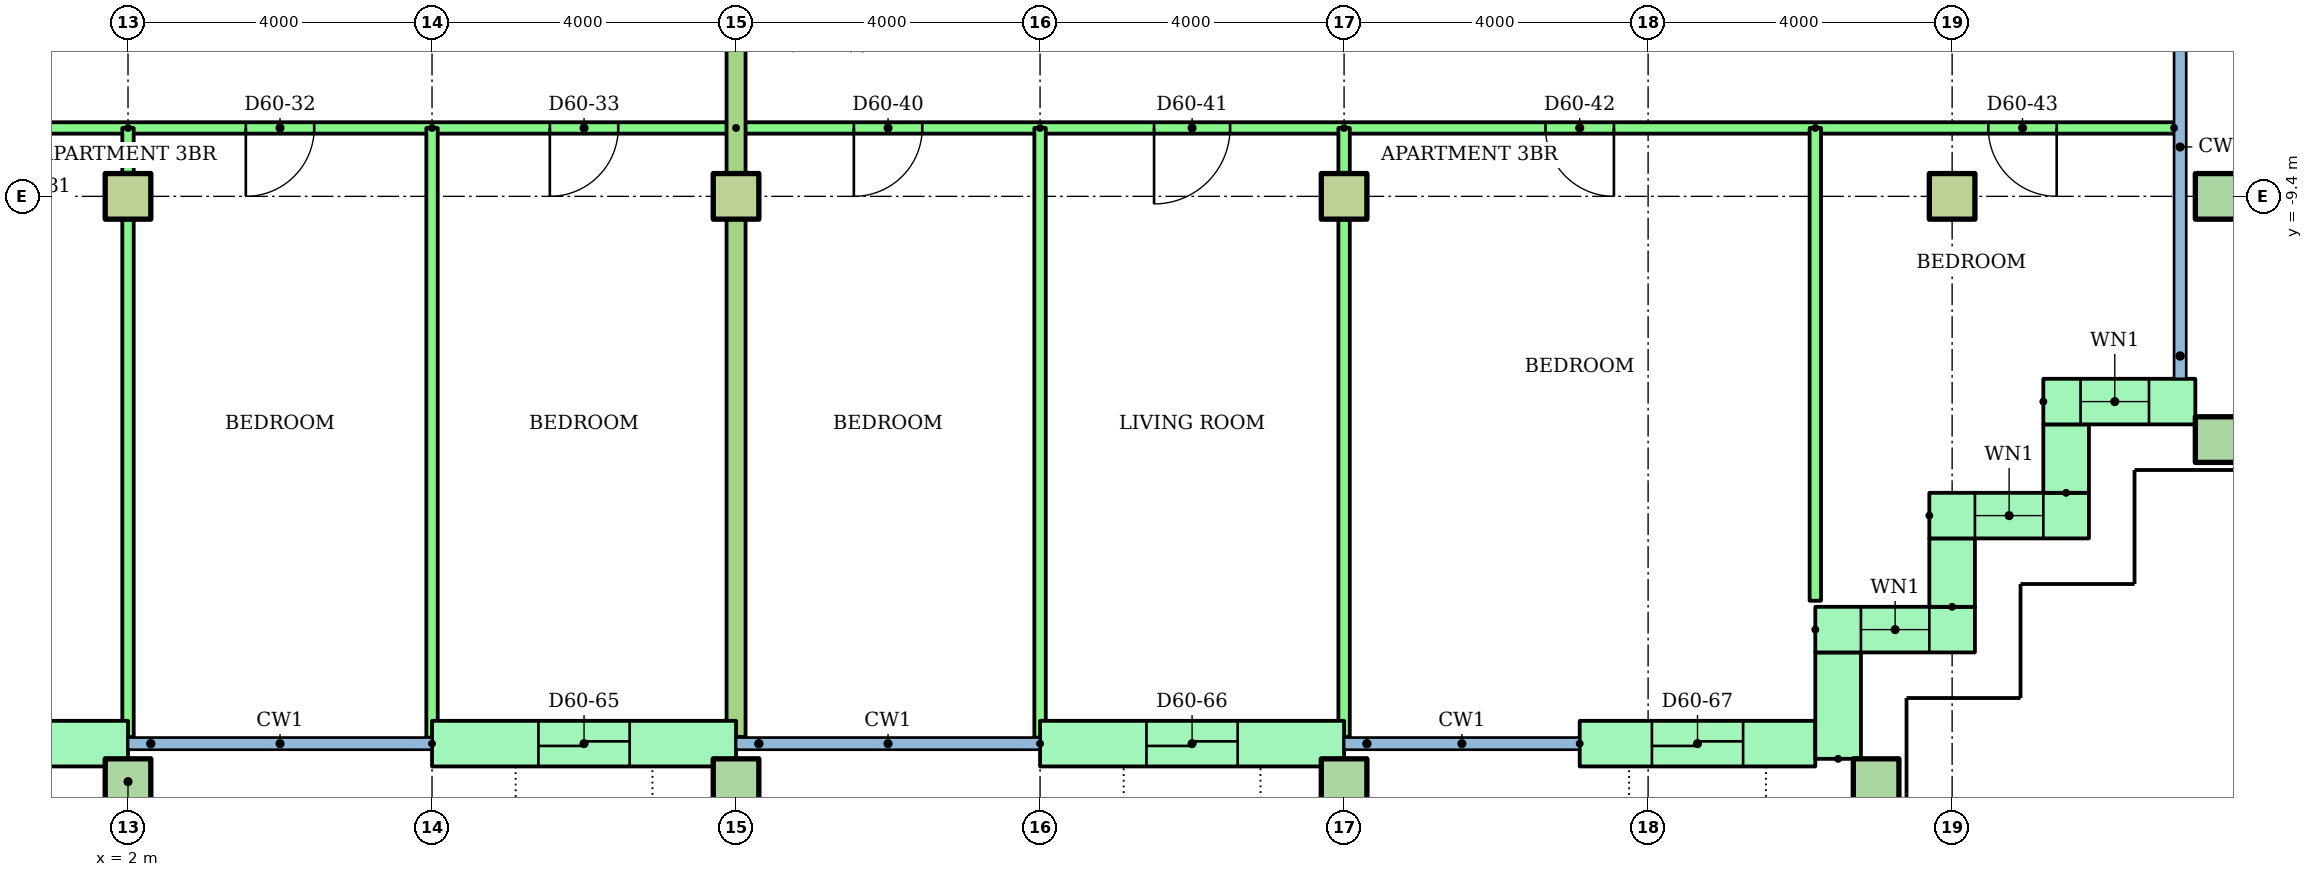
"""IFC4 building model, lengths in metres.
Left out: names, types, materials, properties, quantities, classifications, styles, units other than length and angle.
Written with IfcOpenShell. Run it as: python <this file> out.ifc"""

import sys

from ifc_helpers import new_model, si_unit, direction, frame, frame_2d, origin, origin_2d, place, context, subcontext, project, spatial, rectangle, hollow_rectangle, extrude, element, fill, save


model = new_model("IFC4")
c1 = context("Model", 3, precision=1e-05, world=origin(), true_north=direction((0.0, 1.0)))
c2 = subcontext(c1, "Body", "Model", "MODEL_VIEW")
j1 = project(units=[si_unit("LENGTHUNIT", "METRE"), si_unit("PLANEANGLEUNIT", "RADIAN")], contexts=[c1])
p1 = place(None, origin())
s1 = spatial("IfcSite", under=j1, at=p1, CompositionType="ELEMENT")
p2 = place(p1, origin())
s2 = spatial("IfcBuilding", under=s1, at=p2, CompositionType="ELEMENT")
p3 = place(p2, frame((0.0, 0.0, 230.0)))
s3 = spatial("IfcBuildingStorey", under=s2, at=p3, CompositionType="ELEMENT", Elevation=230.0)
for number, where in (
    (1, (2.0, -17.1, 0.0)),
    (2, (10.0, -17.1, 0.0)),
    (3, (18.0, -17.1, 0.0)),
    (4, (25.0, -17.1, 0.0)),
    (5, (29.5, -12.6, 0.0)),
):
    element("IfcColumn", number, at=place(p3, frame(where)), inside=s3, PredefinedType="COLUMN", context=c2, shape_type="SweptSolid", body=[
        extrude(hollow_rectangle(XDim=0.6, YDim=0.6, WallThickness=0.03, at=origin_2d()), origin(), (0.0, 0.0, 1.0), 3.2),
    ])
for number, where in (
    (6, (2.0, -9.4, 0.0)),
    (7, (10.0, -9.4, 0.0)),
    (8, (18.0, -9.4, 0.0)),
    (9, (26.0, -9.4, 0.0)),
):
    element("IfcColumn", number, at=place(p3, frame(where)), inside=s3, PredefinedType="COLUMN", context=c2, shape_type="SweptSolid", body=[
        extrude(rectangle(XDim=0.6, YDim=0.6, at=origin_2d()), origin(), (0.0, 0.0, 1.0), 3.2),
    ])
p4 = place(p3, frame((29.5, -9.4, 0.0)))
e10 = element("IfcColumn", 10, at=p4, inside=s3, PredefinedType="COLUMN", context=c2, shape_type="SweptSolid", body=[
    extrude(hollow_rectangle(XDim=0.6, YDim=0.6, WallThickness=0.03, at=origin_2d()), origin(), (0.0, 0.0, 1.0), 3.2),
])
p5 = place(p3, frame((-2.0, -16.6, 0.0)))
e11 = element("IfcWall", 11, at=p5, inside=s3, PredefinedType="STANDARD", context=c2, shape_type="SweptSolid", body=[
    extrude(rectangle(XDim=4.0, YDim=0.6, at=frame_2d((2.0, 0.0))), origin(), (0.0, 0.0, 1.0), 2.92),
])
p6 = place(p5, frame((1.4, 0.0, 0.0)))
e12 = element("IfcOpeningElement", 12, at=p6, cuts=e11, PredefinedType="OPENING", context=c2, shape_type="SweptSolid", body=[
    extrude(rectangle(XDim=1.2, YDim=2.1, at=frame_2d((0.6, 1.05))), frame((0.0, 0.31, 0.0), z_axis=(0.0, -1.0, 0.0), x_axis=(1.0, 0.0, 0.0)), (0.0, 0.0, 1.0), 0.62),
])
p7 = place(p3, frame((6.0, -16.6, 0.0)))
e13 = element("IfcWall", 13, at=p7, inside=s3, PredefinedType="STANDARD", context=c2, shape_type="SweptSolid", body=[
    extrude(rectangle(XDim=4.0, YDim=0.6, at=frame_2d((2.0, 0.0))), origin(), (0.0, 0.0, 1.0), 2.92),
])
p8 = place(p7, frame((1.4, 0.0, 0.0)))
e14 = element("IfcOpeningElement", 14, at=p8, cuts=e13, PredefinedType="OPENING", context=c2, shape_type="SweptSolid", body=[
    extrude(rectangle(XDim=1.2, YDim=2.1, at=frame_2d((0.6, 1.05))), frame((0.0, 0.31, 0.0), z_axis=(0.0, -1.0, 0.0), x_axis=(1.0, 0.0, 0.0)), (0.0, 0.0, 1.0), 0.62),
])
p9 = place(p3, frame((14.0, -16.6, 0.0)))
e15 = element("IfcWall", 15, at=p9, inside=s3, PredefinedType="STANDARD", context=c2, shape_type="SweptSolid", body=[
    extrude(rectangle(XDim=4.0, YDim=0.6, at=frame_2d((2.0, 0.0))), origin(), (0.0, 0.0, 1.0), 2.92),
])
p10 = place(p9, frame((1.4, 0.0, 0.0)))
e16 = element("IfcOpeningElement", 16, at=p10, cuts=e15, PredefinedType="OPENING", context=c2, shape_type="SweptSolid", body=[
    extrude(rectangle(XDim=1.2, YDim=2.1, at=frame_2d((0.6, 1.05))), frame((0.0, 0.31, 0.0), z_axis=(0.0, -1.0, 0.0), x_axis=(1.0, 0.0, 0.0)), (0.0, 0.0, 1.0), 0.62),
])
p11 = place(p3, frame((21.1, -16.6, 0.0)))
e17 = element("IfcWall", 17, at=p11, inside=s3, PredefinedType="STANDARD", context=c2, shape_type="SweptSolid", body=[
    extrude(rectangle(XDim=3.1, YDim=0.6, at=frame_2d((1.55, 0.0))), origin(), (0.0, 0.0, 1.0), 2.92),
])
p12 = place(p11, frame((0.95, 0.0, 0.0)))
e18 = element("IfcOpeningElement", 18, at=p12, cuts=e17, PredefinedType="OPENING", context=c2, shape_type="SweptSolid", body=[
    extrude(rectangle(XDim=1.2, YDim=2.1, at=frame_2d((0.6, 1.05))), frame((0.0, 0.31, 0.0), z_axis=(0.0, -1.0, 0.0), x_axis=(1.0, 0.0, 0.0)), (0.0, 0.0, 1.0), 0.62),
])
p13 = place(p3, frame((24.5, -16.8, 0.0), z_axis=(0.0, 0.0, 1.0), x_axis=(0.0, 1.0, 0.0)))
e19 = element("IfcWall", 19, at=p13, inside=s3, PredefinedType="STANDARD", context=c2, shape_type="SweptSolid", body=[
    extrude(rectangle(XDim=1.4, YDim=0.6, at=frame_2d((0.7, 0.0))), origin(), (0.0, 0.0, 1.0), 2.92),
])
p14 = place(p3, frame((24.2, -15.1, 0.0)))
e20 = element("IfcWall", 20, at=p14, inside=s3, PredefinedType="STANDARD", context=c2, shape_type="SweptSolid", body=[
    extrude(rectangle(XDim=2.1, YDim=0.6, at=frame_2d((1.05, 0.0))), origin(), (0.0, 0.0, 1.0), 2.92),
])
p15 = place(p14, frame((0.6, 0.0, 0.9)))
e21 = element("IfcOpeningElement", 21, at=p15, cuts=e20, PredefinedType="OPENING", context=c2, shape_type="SweptSolid", body=[
    extrude(rectangle(XDim=0.9, YDim=1.5, at=frame_2d((0.45, 0.75))), frame((0.0, 0.31, 0.0), z_axis=(0.0, -1.0, 0.0), x_axis=(1.0, 0.0, 0.0)), (0.0, 0.0, 1.0), 0.62),
])
p16 = place(p3, frame((26.0, -14.8, 0.0), z_axis=(0.0, 0.0, 1.0), x_axis=(0.0, 1.0, 0.0)))
e22 = element("IfcWall", 22, at=p16, inside=s3, PredefinedType="STANDARD", context=c2, shape_type="SweptSolid", body=[
    extrude(rectangle(XDim=0.9, YDim=0.6, at=frame_2d((0.45, 0.0))), origin(), (0.0, 0.0, 1.0), 2.92),
])
p17 = place(p3, frame((25.7, -13.6, 0.0)))
e23 = element("IfcWall", 23, at=p17, inside=s3, PredefinedType="STANDARD", context=c2, shape_type="SweptSolid", body=[
    extrude(rectangle(XDim=2.1, YDim=0.6, at=frame_2d((1.05, 0.0))), origin(), (0.0, 0.0, 1.0), 2.92),
])
p18 = place(p17, frame((0.6, 0.0, 0.9)))
e24 = element("IfcOpeningElement", 24, at=p18, cuts=e23, PredefinedType="OPENING", context=c2, shape_type="SweptSolid", body=[
    extrude(rectangle(XDim=0.9, YDim=1.5, at=frame_2d((0.45, 0.75))), frame((0.0, 0.31, 0.0), z_axis=(0.0, -1.0, 0.0), x_axis=(1.0, 0.0, 0.0)), (0.0, 0.0, 1.0), 0.62),
])
p19 = place(p3, frame((27.5, -13.3, 0.0), z_axis=(0.0, 0.0, 1.0), x_axis=(0.0, 1.0, 0.0)))
e25 = element("IfcWall", 25, at=p19, inside=s3, PredefinedType="STANDARD", context=c2, shape_type="SweptSolid", body=[
    extrude(rectangle(XDim=0.9, YDim=0.6, at=frame_2d((0.45, 0.0))), origin(), (0.0, 0.0, 1.0), 2.92),
])
p20 = place(p3, frame((27.2, -12.1, 0.0)))
e26 = element("IfcWall", 26, at=p20, inside=s3, PredefinedType="STANDARD", context=c2, shape_type="SweptSolid", body=[
    extrude(rectangle(XDim=2.0, YDim=0.6, at=frame_2d((1.0, 0.0))), origin(), (0.0, 0.0, 1.0), 2.92),
])
p21 = place(p20, frame((0.49, 0.0, 0.9)))
e27 = element("IfcOpeningElement", 27, at=p21, cuts=e26, PredefinedType="OPENING", context=c2, shape_type="SweptSolid", body=[
    extrude(rectangle(XDim=0.9, YDim=1.5, at=frame_2d((0.45, 0.75))), frame((0.0, 0.31, 0.0), z_axis=(0.0, -1.0, 0.0), x_axis=(1.0, 0.0, 0.0)), (0.0, 0.0, 1.0), 0.62),
])
p22 = place(p3, frame((10.0, -8.5, 0.0), z_axis=(0.0, 0.0, 1.0), x_axis=(-1.0, 0.0, 0.0)))
e28 = element("IfcWall", 28, at=p22, inside=s3, PredefinedType="PARTITIONING", context=c2, shape_type="SweptSolid", body=[
    extrude(rectangle(XDim=16.0, YDim=0.15, at=frame_2d((8.0, 0.0))), origin(), (0.0, 0.0, 1.0), 2.4),
])
p23 = place(p22, frame((13.55, 0.0, 0.0)))
e29 = element("IfcOpeningElement", 29, at=p23, cuts=e28, PredefinedType="OPENING", context=c2, shape_type="SweptSolid", body=[
    extrude(rectangle(XDim=0.9, YDim=2.1, at=frame_2d((0.45, 1.05))), frame((0.0, 0.085, 0.0), z_axis=(0.0, -1.0, 0.0), x_axis=(1.0, 0.0, 0.0)), (0.0, 0.0, 1.0), 0.17),
])
p24 = place(p22, frame((9.5, 0.0, 0.0)))
e30 = element("IfcOpeningElement", 30, at=p24, cuts=e28, PredefinedType="OPENING", context=c2, shape_type="SweptSolid", body=[
    extrude(rectangle(XDim=1.0, YDim=2.1, at=frame_2d((0.5, 1.05))), frame((0.0, 0.085, 0.0), z_axis=(0.0, -1.0, 0.0), x_axis=(1.0, 0.0, 0.0)), (0.0, 0.0, 1.0), 0.17),
])
p25 = place(p22, frame((5.55, 0.0, 0.0)))
e31 = element("IfcOpeningElement", 31, at=p25, cuts=e28, PredefinedType="OPENING", context=c2, shape_type="SweptSolid", body=[
    extrude(rectangle(XDim=0.9, YDim=2.1, at=frame_2d((0.45, 1.05))), frame((0.0, 0.085, 0.0), z_axis=(0.0, -1.0, 0.0), x_axis=(1.0, 0.0, 0.0)), (0.0, 0.0, 1.0), 0.17),
])
p26 = place(p22, frame((1.55, 0.0, 0.0)))
e32 = element("IfcOpeningElement", 32, at=p26, cuts=e28, PredefinedType="OPENING", context=c2, shape_type="SweptSolid", body=[
    extrude(rectangle(XDim=0.9, YDim=2.1, at=frame_2d((0.45, 1.05))), frame((0.0, 0.085, 0.0), z_axis=(0.0, -1.0, 0.0), x_axis=(1.0, 0.0, 0.0)), (0.0, 0.0, 1.0), 0.17),
])
p27 = place(p3, frame((2.0, -8.5, 0.0), z_axis=(0.0, 0.0, 1.0), x_axis=(0.0, -1.0, 0.0)))
e33 = element("IfcWall", 33, at=p27, inside=s3, PredefinedType="PARTITIONING", context=c2, shape_type="SweptSolid", body=[
    extrude(rectangle(XDim=8.01, YDim=0.15, at=frame_2d((4.005, 0.0))), origin(), (0.0, 0.0, 1.0), 2.4),
])
p28 = place(p3, frame((6.0, -8.5, 0.0), z_axis=(0.0, 0.0, 1.0), x_axis=(0.0, -1.0, 0.0)))
e34 = element("IfcWall", 34, at=p28, inside=s3, PredefinedType="PARTITIONING", context=c2, shape_type="SweptSolid", body=[
    extrude(rectangle(XDim=8.021, YDim=0.15, at=frame_2d((4.01, 0.0))), origin(), (0.0, 0.0, 1.0), 2.4),
])
p29 = place(p3, frame((28.92, -8.5, 0.0), z_axis=(0.0, 0.0, 1.0), x_axis=(-1.0, 0.0, 0.0)))
e35 = element("IfcWall", 35, at=p29, inside=s3, PredefinedType="PARTITIONING", context=c2, shape_type="SweptSolid", body=[
    extrude(rectangle(XDim=18.92, YDim=0.15, at=frame_2d((9.46, 0.0))), origin(), (0.0, 0.0, 1.0), 2.4),
])
p30 = place(p29, frame((16.47, 0.0, 0.0)))
e36 = element("IfcOpeningElement", 36, at=p30, cuts=e35, PredefinedType="OPENING", context=c2, shape_type="SweptSolid", body=[
    extrude(rectangle(XDim=0.9, YDim=2.1, at=frame_2d((0.45, 1.05))), frame((0.0, 0.085, 0.0), z_axis=(0.0, -1.0, 0.0), x_axis=(1.0, 0.0, 0.0)), (0.0, 0.0, 1.0), 0.17),
])
p31 = place(p29, frame((12.42, 0.0, 0.0)))
e37 = element("IfcOpeningElement", 37, at=p31, cuts=e35, PredefinedType="OPENING", context=c2, shape_type="SweptSolid", body=[
    extrude(rectangle(XDim=1.0, YDim=2.1, at=frame_2d((0.5, 1.05))), frame((0.0, 0.085, 0.0), z_axis=(0.0, -1.0, 0.0), x_axis=(1.0, 0.0, 0.0)), (0.0, 0.0, 1.0), 0.17),
])
p32 = place(p29, frame((7.37, 0.0, 0.0)))
e38 = element("IfcOpeningElement", 38, at=p32, cuts=e35, PredefinedType="OPENING", context=c2, shape_type="SweptSolid", body=[
    extrude(rectangle(XDim=0.9, YDim=2.1, at=frame_2d((0.45, 1.05))), frame((0.0, 0.085, 0.0), z_axis=(0.0, -1.0, 0.0), x_axis=(1.0, 0.0, 0.0)), (0.0, 0.0, 1.0), 0.17),
])
p33 = place(p29, frame((1.544, 0.0, 0.0)))
e39 = element("IfcOpeningElement", 39, at=p33, cuts=e35, PredefinedType="OPENING", context=c2, shape_type="SweptSolid", body=[
    extrude(rectangle(XDim=0.9, YDim=2.1, at=frame_2d((0.45, 1.05))), frame((0.0, 0.085, 0.0), z_axis=(0.0, -1.0, 0.0), x_axis=(1.0, 0.0, 0.0)), (0.0, 0.0, 1.0), 0.17),
])
p34 = place(p3, frame((14.0, -8.5, 0.0), z_axis=(0.0, 0.0, 1.0), x_axis=(0.0, -1.0, 0.0)))
e40 = element("IfcWall", 40, at=p34, inside=s3, PredefinedType="PARTITIONING", context=c2, shape_type="SweptSolid", body=[
    extrude(rectangle(XDim=8.021, YDim=0.15, at=frame_2d((4.01, 0.0))), origin(), (0.0, 0.0, 1.0), 2.4),
])
p35 = place(p3, frame((18.0, -8.5, 0.0), z_axis=(0.0, 0.0, 1.0), x_axis=(0.0, -1.0, 0.0)))
e41 = element("IfcWall", 41, at=p35, inside=s3, PredefinedType="PARTITIONING", context=c2, shape_type="SweptSolid", body=[
    extrude(rectangle(XDim=8.01, YDim=0.15, at=frame_2d((4.005, 0.0))), origin(), (0.0, 0.0, 1.0), 2.4),
])
p36 = place(p3, frame((24.2, -8.5, 0.0), z_axis=(0.0, 0.0, 1.0), x_axis=(0.0, -1.0, 0.0)))
e42 = element("IfcWall", 42, at=p36, inside=s3, PredefinedType="PARTITIONING", context=c2, shape_type="SweptSolid", body=[
    extrude(rectangle(XDim=6.22, YDim=0.15, at=frame_2d((3.11, 0.0))), origin(), (0.0, 0.0, 1.0), 2.4),
])
p37 = place(p3, frame((10.0, -1.4, 0.0), z_axis=(0.0, 0.0, 1.0), x_axis=(0.0, -1.0, 0.0)))
e43 = element("IfcWall", 43, at=p37, inside=s3, PredefinedType="PARTITIONING", context=c2, shape_type="SweptSolid", body=[
    extrude(rectangle(XDim=15.11, YDim=0.25, at=frame_2d((7.555, 0.0))), origin(), (0.0, 0.0, 1.0), 2.4),
])
p38 = place(p15, origin())
e44 = element("IfcWindow", 44, at=p38, inside=s3, PartitioningType="SINGLE_PANEL", PredefinedType="WINDOW", context=c2, shape_type="SweptSolid", body=[
    extrude(rectangle(XDim=0.9, YDim=1.5, at=frame_2d((0.45, 0.75))), frame((0.0, 0.03, 0.0), z_axis=(0.0, -1.0, 0.0), x_axis=(1.0, 0.0, 0.0)), (0.0, 0.0, 1.0), 0.06),
])
fill(e21, e44)
p39 = place(p18, origin())
e45 = element("IfcWindow", 45, at=p39, inside=s3, PartitioningType="SINGLE_PANEL", PredefinedType="WINDOW", context=c2, shape_type="SweptSolid", body=[
    extrude(rectangle(XDim=0.9, YDim=1.5, at=frame_2d((0.45, 0.75))), frame((0.0, 0.03, 0.0), z_axis=(0.0, -1.0, 0.0), x_axis=(1.0, 0.0, 0.0)), (0.0, 0.0, 1.0), 0.06),
])
fill(e24, e45)
p40 = place(p21, origin())
e46 = element("IfcWindow", 46, at=p40, inside=s3, PartitioningType="SINGLE_PANEL", PredefinedType="WINDOW", context=c2, shape_type="SweptSolid", body=[
    extrude(rectangle(XDim=0.9, YDim=1.5, at=frame_2d((0.45, 0.75))), frame((0.0, 0.03, 0.0), z_axis=(0.0, -1.0, 0.0), x_axis=(1.0, 0.0, 0.0)), (0.0, 0.0, 1.0), 0.06),
])
fill(e27, e46)
p41 = place(p25, origin())
e47 = element("IfcDoor", 47, at=p41, inside=s3, OperationType="SINGLE_SWING_RIGHT", PredefinedType="DOOR", context=c2, shape_type="SweptSolid", body=[
    extrude(rectangle(XDim=0.9, YDim=2.1, at=frame_2d((0.45, 1.05))), frame((0.0, 0.025, 0.0), z_axis=(0.0, -1.0, 0.0), x_axis=(1.0, 0.0, 0.0)), (0.0, 0.0, 1.0), 0.05),
])
fill(e31, e47)
p42 = place(p26, origin())
e48 = element("IfcDoor", 48, at=p42, inside=s3, OperationType="SINGLE_SWING_RIGHT", PredefinedType="DOOR", context=c2, shape_type="SweptSolid", body=[
    extrude(rectangle(XDim=0.9, YDim=2.1, at=frame_2d((0.45, 1.05))), frame((0.0, 0.025, 0.0), z_axis=(0.0, -1.0, 0.0), x_axis=(1.0, 0.0, 0.0)), (0.0, 0.0, 1.0), 0.05),
])
fill(e32, e48)
p43 = place(p30, origin())
e49 = element("IfcDoor", 49, at=p43, inside=s3, OperationType="SINGLE_SWING_RIGHT", PredefinedType="DOOR", context=c2, shape_type="SweptSolid", body=[
    extrude(rectangle(XDim=0.9, YDim=2.1, at=frame_2d((0.45, 1.05))), frame((0.0, 0.025, 0.0), z_axis=(0.0, -1.0, 0.0), x_axis=(1.0, 0.0, 0.0)), (0.0, 0.0, 1.0), 0.05),
])
fill(e36, e49)
p44 = place(p31, origin())
e50 = element("IfcDoor", 50, at=p44, inside=s3, OperationType="SINGLE_SWING_RIGHT", PredefinedType="DOOR", context=c2, shape_type="SweptSolid", body=[
    extrude(rectangle(XDim=1.0, YDim=2.1, at=frame_2d((0.5, 1.05))), frame((0.0, 0.025, 0.0), z_axis=(0.0, -1.0, 0.0), x_axis=(1.0, 0.0, 0.0)), (0.0, 0.0, 1.0), 0.05),
])
fill(e37, e50)
p45 = place(p32, origin())
e51 = element("IfcDoor", 51, at=p45, inside=s3, OperationType="SINGLE_SWING_LEFT", PredefinedType="DOOR", context=c2, shape_type="SweptSolid", body=[
    extrude(rectangle(XDim=0.9, YDim=2.1, at=frame_2d((0.45, 1.05))), frame((0.0, 0.025, 0.0), z_axis=(0.0, -1.0, 0.0), x_axis=(1.0, 0.0, 0.0)), (0.0, 0.0, 1.0), 0.05),
])
fill(e38, e51)
p46 = place(p33, origin())
e52 = element("IfcDoor", 52, at=p46, inside=s3, OperationType="SINGLE_SWING_LEFT", PredefinedType="DOOR", context=c2, shape_type="SweptSolid", body=[
    extrude(rectangle(XDim=0.9, YDim=2.1, at=frame_2d((0.45, 1.05))), frame((0.0, 0.025, 0.0), z_axis=(0.0, -1.0, 0.0), x_axis=(1.0, 0.0, 0.0)), (0.0, 0.0, 1.0), 0.05),
])
fill(e39, e52)
p47 = place(p8, origin())
e53 = element("IfcDoor", 53, at=p47, inside=s3, OperationType="SLIDING_TO_LEFT", PredefinedType="DOOR", context=c2, shape_type="SweptSolid", body=[
    extrude(rectangle(XDim=1.2, YDim=2.1, at=frame_2d((0.6, 1.05))), frame((0.0, 0.025, 0.0), z_axis=(0.0, -1.0, 0.0), x_axis=(1.0, 0.0, 0.0)), (0.0, 0.0, 1.0), 0.05),
])
fill(e14, e53)
p48 = place(p10, origin())
e54 = element("IfcDoor", 54, at=p48, inside=s3, OperationType="SLIDING_TO_LEFT", PredefinedType="DOOR", context=c2, shape_type="SweptSolid", body=[
    extrude(rectangle(XDim=1.2, YDim=2.1, at=frame_2d((0.6, 1.05))), frame((0.0, 0.025, 0.0), z_axis=(0.0, -1.0, 0.0), x_axis=(1.0, 0.0, 0.0)), (0.0, 0.0, 1.0), 0.05),
])
fill(e16, e54)
p49 = place(p12, origin())
e55 = element("IfcDoor", 55, at=p49, inside=s3, OperationType="SLIDING_TO_LEFT", PredefinedType="DOOR", context=c2, shape_type="SweptSolid", body=[
    extrude(rectangle(XDim=1.2, YDim=2.1, at=frame_2d((0.6, 1.05))), frame((0.0, 0.025, 0.0), z_axis=(0.0, -1.0, 0.0), x_axis=(1.0, 0.0, 0.0)), (0.0, 0.0, 1.0), 0.05),
])
fill(e18, e55)
save(model, sys.argv[1])
